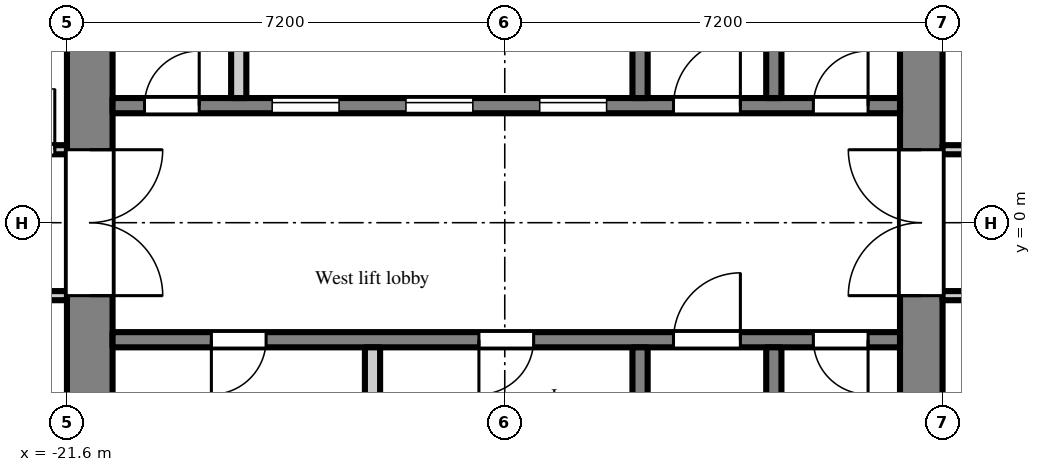
"""IFC4 building model, lengths in metres.
Left out: names, types, materials, properties, quantities, classifications, styles, units other than length and angle.
Written with IfcOpenShell. Run it as: python <this file> out.ifc"""

import sys

from ifc_helpers import new_model, si_unit, direction, frame, frame_2d, origin, place, context, subcontext, project, spatial, rectangle, extrude, element, fill, save


model = new_model("IFC4")
c1 = context("Model", 3, precision=1e-05, world=origin(), true_north=direction((0.0, 1.0)))
c2 = subcontext(c1, "Body", "Model", "MODEL_VIEW")
j1 = project(units=[si_unit("LENGTHUNIT", "METRE"), si_unit("PLANEANGLEUNIT", "RADIAN")], contexts=[c1])
p1 = place(None, origin())
s1 = spatial("IfcSite", under=j1, at=p1, CompositionType="ELEMENT")
p2 = place(p1, origin())
s2 = spatial("IfcBuilding", under=s1, at=p2, CompositionType="ELEMENT")
p3 = place(p2, frame((0.0, 0.0, 198.9)))
s3 = spatial("IfcBuildingStorey", under=s2, at=p3, CompositionType="ELEMENT", Elevation=198.9)
p4 = place(p3, frame((-7.55, -7.2, 0.0), z_axis=(0.0, 0.0, 1.0), x_axis=(0.0, 1.0, 0.0)))
e1 = element("IfcWall", 1, at=p4, inside=s3, PredefinedType="SHEAR", context=c2, shape_type="SweptSolid", body=[
    extrude(rectangle(XDim=14.4, YDim=0.7, at=frame_2d((7.2, 0.0))), origin(), (0.0, 0.0, 1.0), 2.6),
])
p5 = place(p4, frame((6.0, 0.0, 0.0)))
e2 = element("IfcOpeningElement", 2, at=p5, cuts=e1, PredefinedType="OPENING", context=c2, shape_type="SweptSolid", body=[
    extrude(rectangle(XDim=2.4, YDim=2.2, at=frame_2d((1.2, 1.1))), frame((0.0, 0.36, 0.0), z_axis=(0.0, -1.0, 0.0), x_axis=(1.0, 0.0, 0.0)), (0.0, 0.0, 1.0), 0.72),
])
p6 = place(p3, frame((-21.225, -7.2, 0.0), z_axis=(0.0, 0.0, 1.0), x_axis=(0.0, 1.0, 0.0)))
e3 = element("IfcWall", 3, at=p6, inside=s3, PredefinedType="SHEAR", context=c2, shape_type="SweptSolid", body=[
    extrude(rectangle(XDim=14.4, YDim=0.75, at=frame_2d((7.2, 0.0))), origin(), (0.0, 0.0, 1.0), 2.6),
])
p7 = place(p6, frame((6.0, 0.0, 0.0)))
e4 = element("IfcOpeningElement", 4, at=p7, cuts=e3, PredefinedType="OPENING", context=c2, shape_type="SweptSolid", body=[
    extrude(rectangle(XDim=2.4, YDim=2.2, at=frame_2d((1.2, 1.1))), frame((0.0, 0.385, 0.0), z_axis=(0.0, -1.0, 0.0), x_axis=(1.0, 0.0, 0.0)), (0.0, 0.0, 1.0), 0.77),
])
p8 = place(p3, frame((-7.9, 1.925, 0.0), z_axis=(0.0, 0.0, 1.0), x_axis=(-1.0, 0.0, 0.0)))
e5 = element("IfcWall", 5, at=p8, inside=s3, PredefinedType="SHEAR", context=c2, shape_type="SweptSolid", body=[
    extrude(rectangle(XDim=12.95, YDim=0.25, at=frame_2d((6.475, 0.0))), origin(), (0.0, 0.0, 1.0), 2.6),
])
p9 = place(p8, frame((4.825, 0.0, 0.0)))
e6 = element("IfcOpeningElement", 6, at=p9, cuts=e5, PredefinedType="OPENING", context=c2, shape_type="SweptSolid", body=[
    extrude(rectangle(XDim=1.1, YDim=2.1, at=frame_2d((0.55, 1.05))), frame((0.0, 0.135, 0.0), z_axis=(0.0, -1.0, 0.0), x_axis=(1.0, 0.0, 0.0)), (0.0, 0.0, 1.0), 0.27),
])
p10 = place(p8, frame((7.025, 0.0, 0.0)))
e7 = element("IfcOpeningElement", 7, at=p10, cuts=e5, PredefinedType="OPENING", context=c2, shape_type="SweptSolid", body=[
    extrude(rectangle(XDim=1.1, YDim=2.1, at=frame_2d((0.55, 1.05))), frame((0.0, 0.135, 0.0), z_axis=(0.0, -1.0, 0.0), x_axis=(1.0, 0.0, 0.0)), (0.0, 0.0, 1.0), 0.27),
])
p11 = place(p8, frame((9.225, 0.0, 0.0)))
e8 = element("IfcOpeningElement", 8, at=p11, cuts=e5, PredefinedType="OPENING", context=c2, shape_type="SweptSolid", body=[
    extrude(rectangle(XDim=1.1, YDim=2.1, at=frame_2d((0.55, 1.05))), frame((0.0, 0.135, 0.0), z_axis=(0.0, -1.0, 0.0), x_axis=(1.0, 0.0, 0.0)), (0.0, 0.0, 1.0), 0.27),
])
p12 = place(p8, frame((0.525, 0.0, 0.0)))
e9 = element("IfcOpeningElement", 9, at=p12, cuts=e5, PredefinedType="OPENING", context=c2, shape_type="SweptSolid", body=[
    extrude(rectangle(XDim=0.9, YDim=2.1, at=frame_2d((0.45, 1.05))), frame((0.0, 0.135, 0.0), z_axis=(0.0, -1.0, 0.0), x_axis=(1.0, 0.0, 0.0)), (0.0, 0.0, 1.0), 0.27),
])
p13 = place(p8, frame((2.625, 0.0, 0.0)))
e10 = element("IfcOpeningElement", 10, at=p13, cuts=e5, PredefinedType="OPENING", context=c2, shape_type="SweptSolid", body=[
    extrude(rectangle(XDim=1.1, YDim=2.1, at=frame_2d((0.55, 1.05))), frame((0.0, 0.135, 0.0), z_axis=(0.0, -1.0, 0.0), x_axis=(1.0, 0.0, 0.0)), (0.0, 0.0, 1.0), 0.27),
])
p14 = place(p8, frame((11.525, 0.0, 0.0)))
e11 = element("IfcOpeningElement", 11, at=p14, cuts=e5, PredefinedType="OPENING", context=c2, shape_type="SweptSolid", body=[
    extrude(rectangle(XDim=0.9, YDim=2.1, at=frame_2d((0.45, 1.05))), frame((0.0, 0.135, 0.0), z_axis=(0.0, -1.0, 0.0), x_axis=(1.0, 0.0, 0.0)), (0.0, 0.0, 1.0), 0.27),
])
p15 = place(p3, frame((-9.975, 2.05, 0.0), z_axis=(0.0, 0.0, 1.0), x_axis=(0.0, 1.0, 0.0)))
e12 = element("IfcWall", 12, at=p15, inside=s3, PredefinedType="SHEAR", context=c2, shape_type="SweptSolid", body=[
    extrude(rectangle(XDim=4.75, YDim=0.25, at=frame_2d((2.375, 0.0))), origin(), (0.0, 0.0, 1.0), 2.6),
])
p16 = place(p15, frame((2.95, 0.0, 0.0)))
e13 = element("IfcOpeningElement", 13, at=p16, cuts=e12, PredefinedType="OPENING", context=c2, shape_type="SweptSolid", body=[
    extrude(rectangle(XDim=1.1, YDim=2.1, at=frame_2d((0.55, 1.05))), frame((0.0, 0.135, 0.0), z_axis=(0.0, -1.0, 0.0), x_axis=(1.0, 0.0, 0.0)), (0.0, 0.0, 1.0), 0.27),
])
p17 = place(p3, frame((-12.175, 2.05, 0.0), z_axis=(0.0, 0.0, 1.0), x_axis=(0.0, 1.0, 0.0)))
e14 = element("IfcWall", 14, at=p17, inside=s3, PredefinedType="SHEAR", context=c2, shape_type="SweptSolid", body=[
    extrude(rectangle(XDim=4.75, YDim=0.25, at=frame_2d((2.375, 0.0))), origin(), (0.0, 0.0, 1.0), 2.6),
])
p18 = place(p17, frame((3.0, 0.0, 0.0)))
e15 = element("IfcOpeningElement", 15, at=p18, cuts=e14, PredefinedType="OPENING", context=c2, shape_type="SweptSolid", body=[
    extrude(rectangle(XDim=1.1, YDim=2.1, at=frame_2d((0.55, 1.05))), frame((0.0, 0.135, 0.0), z_axis=(0.0, -1.0, 0.0), x_axis=(1.0, 0.0, 0.0)), (0.0, 0.0, 1.0), 0.27),
])
p19 = place(p3, frame((-18.775, 2.05, 0.0), z_axis=(0.0, 0.0, 1.0), x_axis=(0.0, 1.0, 0.0)))
e16 = element("IfcWall", 16, at=p19, inside=s3, PredefinedType="PARTITIONING", context=c2, shape_type="SweptSolid", body=[
    extrude(rectangle(XDim=2.1, YDim=0.25, at=frame_2d((1.05, 0.0))), origin(), (0.0, 0.0, 1.0), 2.6),
])
p20 = place(p3, frame((-7.9, -1.925, 0.0), z_axis=(0.0, 0.0, 1.0), x_axis=(-1.0, 0.0, 0.0)))
e17 = element("IfcWall", 17, at=p20, inside=s3, PredefinedType="SHEAR", context=c2, shape_type="SweptSolid", body=[
    extrude(rectangle(XDim=12.95, YDim=0.25, at=frame_2d((6.475, 0.0))), origin(), (0.0, 0.0, 1.0), 2.6),
])
p21 = place(p20, frame((0.525, 0.0, 0.0)))
e18 = element("IfcOpeningElement", 18, at=p21, cuts=e17, PredefinedType="OPENING", context=c2, shape_type="SweptSolid", body=[
    extrude(rectangle(XDim=0.9, YDim=2.1, at=frame_2d((0.45, 1.05))), frame((0.0, 0.135, 0.0), z_axis=(0.0, -1.0, 0.0), x_axis=(1.0, 0.0, 0.0)), (0.0, 0.0, 1.0), 0.27),
])
p22 = place(p20, frame((2.625, 0.0, 0.0)))
e19 = element("IfcOpeningElement", 19, at=p22, cuts=e17, PredefinedType="OPENING", context=c2, shape_type="SweptSolid", body=[
    extrude(rectangle(XDim=1.1, YDim=2.1, at=frame_2d((0.55, 1.05))), frame((0.0, 0.135, 0.0), z_axis=(0.0, -1.0, 0.0), x_axis=(1.0, 0.0, 0.0)), (0.0, 0.0, 1.0), 0.27),
])
p23 = place(p20, frame((6.025, 0.0, 0.0)))
e20 = element("IfcOpeningElement", 20, at=p23, cuts=e17, PredefinedType="OPENING", context=c2, shape_type="SweptSolid", body=[
    extrude(rectangle(XDim=0.9, YDim=2.1, at=frame_2d((0.45, 1.05))), frame((0.0, 0.135, 0.0), z_axis=(0.0, -1.0, 0.0), x_axis=(1.0, 0.0, 0.0)), (0.0, 0.0, 1.0), 0.27),
])
p24 = place(p20, frame((10.425, 0.0, 0.0)))
e21 = element("IfcOpeningElement", 21, at=p24, cuts=e17, PredefinedType="OPENING", context=c2, shape_type="SweptSolid", body=[
    extrude(rectangle(XDim=0.9, YDim=2.1, at=frame_2d((0.45, 1.05))), frame((0.0, 0.135, 0.0), z_axis=(0.0, -1.0, 0.0), x_axis=(1.0, 0.0, 0.0)), (0.0, 0.0, 1.0), 0.27),
])
p25 = place(p3, frame((-9.975, -2.05, 0.0), z_axis=(0.0, 0.0, 1.0), x_axis=(0.0, -1.0, 0.0)))
e22 = element("IfcWall", 22, at=p25, inside=s3, PredefinedType="SHEAR", context=c2, shape_type="SweptSolid", body=[
    extrude(rectangle(XDim=4.75, YDim=0.25, at=frame_2d((2.375, 0.0))), origin(), (0.0, 0.0, 1.0), 2.6),
])
p26 = place(p25, frame((2.95, 0.0, 0.0)))
e23 = element("IfcOpeningElement", 23, at=p26, cuts=e22, PredefinedType="OPENING", context=c2, shape_type="SweptSolid", body=[
    extrude(rectangle(XDim=1.1, YDim=2.1, at=frame_2d((0.55, 1.05))), frame((0.0, 0.135, 0.0), z_axis=(0.0, -1.0, 0.0), x_axis=(1.0, 0.0, 0.0)), (0.0, 0.0, 1.0), 0.27),
])
p27 = place(p3, frame((-12.175, -2.05, 0.0), z_axis=(0.0, 0.0, 1.0), x_axis=(0.0, -1.0, 0.0)))
e24 = element("IfcWall", 24, at=p27, inside=s3, PredefinedType="SHEAR", context=c2, shape_type="SweptSolid", body=[
    extrude(rectangle(XDim=4.75, YDim=0.25, at=frame_2d((2.375, 0.0))), origin(), (0.0, 0.0, 1.0), 2.6),
])
p28 = place(p27, frame((3.0, 0.0, 0.0)))
e25 = element("IfcOpeningElement", 25, at=p28, cuts=e24, PredefinedType="OPENING", context=c2, shape_type="SweptSolid", body=[
    extrude(rectangle(XDim=1.1, YDim=2.1, at=frame_2d((0.55, 1.05))), frame((0.0, 0.135, 0.0), z_axis=(0.0, -1.0, 0.0), x_axis=(1.0, 0.0, 0.0)), (0.0, 0.0, 1.0), 0.27),
])
p29 = place(p3, frame((-16.575, -2.05, 0.0), z_axis=(0.0, 0.0, 1.0), x_axis=(0.0, -1.0, 0.0)))
e26 = element("IfcWall", 26, at=p29, inside=s3, PredefinedType="PARTITIONING", context=c2, shape_type="SweptSolid", body=[
    extrude(rectangle(XDim=2.1, YDim=0.25, at=frame_2d((1.05, 0.0))), origin(), (0.0, 0.0, 1.0), 2.6),
])
p30 = place(p3, frame((-25.125, -1.2, 0.0), z_axis=(0.0, 0.0, 1.0), x_axis=(1.0, 0.0, 0.0)))
e27 = element("IfcWall", 27, at=p30, inside=s3, PredefinedType="PARTITIONING", context=c2, shape_type="SweptSolid", body=[
    extrude(rectangle(XDim=3.525, YDim=0.15, at=frame_2d((1.762, 0.0))), origin(), (0.0, 0.0, 1.0), 2.6),
])
p31 = place(p30, frame((1.925, 0.0, 0.0)))
e28 = element("IfcOpeningElement", 28, at=p31, cuts=e27, PredefinedType="OPENING", context=c2, shape_type="SweptSolid", body=[
    extrude(rectangle(XDim=1.0, YDim=2.1, at=frame_2d((0.5, 1.05))), frame((0.0, 0.085, 0.0), z_axis=(0.0, -1.0, 0.0), x_axis=(1.0, 0.0, 0.0)), (0.0, 0.0, 1.0), 0.17),
])
p32 = place(p3, frame((-25.125, 1.2, 0.0), z_axis=(0.0, 0.0, 1.0), x_axis=(1.0, 0.0, 0.0)))
e29 = element("IfcWall", 29, at=p32, inside=s3, PredefinedType="PARTITIONING", context=c2, shape_type="SweptSolid", body=[
    extrude(rectangle(XDim=3.525, YDim=0.15, at=frame_2d((1.762, 0.0))), origin(), (0.0, 0.0, 1.0), 2.6),
])
p33 = place(p32, frame((2.325, 0.0, 0.0)))
e30 = element("IfcOpeningElement", 30, at=p33, cuts=e29, PredefinedType="OPENING", context=c2, shape_type="SweptSolid", body=[
    extrude(rectangle(XDim=1.0, YDim=2.1, at=frame_2d((0.5, 1.05))), frame((0.0, 0.085, 0.0), z_axis=(0.0, -1.0, 0.0), x_axis=(1.0, 0.0, 0.0)), (0.0, 0.0, 1.0), 0.17),
])
p34 = place(p3, frame((-7.2, -1.2, 0.0), z_axis=(0.0, 0.0, 1.0), x_axis=(1.0, 0.0, 0.0)))
e31 = element("IfcWall", 31, at=p34, inside=s3, PredefinedType="PARTITIONING", context=c2, shape_type="SweptSolid", body=[
    extrude(rectangle(XDim=6.075, YDim=0.15, at=frame_2d((3.038, 0.0))), origin(), (0.0, 0.0, 1.0), 2.6),
])
p35 = place(p34, frame((2.55, 0.0, 0.0)))
e32 = element("IfcOpeningElement", 32, at=p35, cuts=e31, PredefinedType="OPENING", context=c2, shape_type="SweptSolid", body=[
    extrude(rectangle(XDim=0.9, YDim=2.1, at=frame_2d((0.45, 1.05))), frame((0.0, 0.085, 0.0), z_axis=(0.0, -1.0, 0.0), x_axis=(1.0, 0.0, 0.0)), (0.0, 0.0, 1.0), 0.17),
])
p36 = place(p3, frame((-7.2, 1.2, 0.0), z_axis=(0.0, 0.0, 1.0), x_axis=(1.0, 0.0, 0.0)))
e33 = element("IfcWall", 33, at=p36, inside=s3, PredefinedType="PARTITIONING", context=c2, shape_type="SweptSolid", body=[
    extrude(rectangle(XDim=6.075, YDim=0.15, at=frame_2d((3.038, 0.0))), origin(), (0.0, 0.0, 1.0), 2.6),
])
p37 = place(p36, frame((2.55, 0.0, 0.0)))
e34 = element("IfcOpeningElement", 34, at=p37, cuts=e33, PredefinedType="OPENING", context=c2, shape_type="SweptSolid", body=[
    extrude(rectangle(XDim=0.9, YDim=2.1, at=frame_2d((0.45, 1.05))), frame((0.0, 0.085, 0.0), z_axis=(0.0, -1.0, 0.0), x_axis=(1.0, 0.0, 0.0)), (0.0, 0.0, 1.0), 0.17),
])
p38 = place(p36, frame((0.55, 0.0, 0.0)))
e35 = element("IfcOpeningElement", 35, at=p38, cuts=e33, PredefinedType="OPENING", context=c2, shape_type="SweptSolid", body=[
    extrude(rectangle(XDim=0.9, YDim=2.1, at=frame_2d((0.45, 1.05))), frame((0.0, 0.085, 0.0), z_axis=(0.0, -1.0, 0.0), x_axis=(1.0, 0.0, 0.0)), (0.0, 0.0, 1.0), 0.17),
])
p39 = place(p9, origin())
e36 = element("IfcDoor", 36, at=p39, inside=s3, OperationType="SLIDING_TO_LEFT", PredefinedType="DOOR", context=c2, shape_type="SweptSolid", body=[
    extrude(rectangle(XDim=1.1, YDim=2.1, at=frame_2d((0.55, 1.05))), frame((0.0, 0.025, 0.0), z_axis=(0.0, -1.0, 0.0), x_axis=(1.0, 0.0, 0.0)), (0.0, 0.0, 1.0), 0.05),
])
fill(e6, e36)
p40 = place(p10, origin())
e37 = element("IfcDoor", 37, at=p40, inside=s3, OperationType="SLIDING_TO_LEFT", PredefinedType="DOOR", context=c2, shape_type="SweptSolid", body=[
    extrude(rectangle(XDim=1.1, YDim=2.1, at=frame_2d((0.55, 1.05))), frame((0.0, 0.025, 0.0), z_axis=(0.0, -1.0, 0.0), x_axis=(1.0, 0.0, 0.0)), (0.0, 0.0, 1.0), 0.05),
])
fill(e7, e37)
p41 = place(p11, origin())
e38 = element("IfcDoor", 38, at=p41, inside=s3, OperationType="SLIDING_TO_LEFT", PredefinedType="DOOR", context=c2, shape_type="SweptSolid", body=[
    extrude(rectangle(XDim=1.1, YDim=2.1, at=frame_2d((0.55, 1.05))), frame((0.0, 0.025, 0.0), z_axis=(0.0, -1.0, 0.0), x_axis=(1.0, 0.0, 0.0)), (0.0, 0.0, 1.0), 0.05),
])
fill(e8, e38)
p42 = place(p12, frame((0.9, 0.0, 0.0), z_axis=(0.0, 0.0, 1.0), x_axis=(-1.0, 0.0, 0.0)))
e39 = element("IfcDoor", 39, at=p42, inside=s3, OperationType="SINGLE_SWING_RIGHT", PredefinedType="DOOR", context=c2, shape_type="SweptSolid", body=[
    extrude(rectangle(XDim=0.9, YDim=2.1, at=frame_2d((0.45, 1.05))), frame((0.0, 0.025, 0.0), z_axis=(0.0, -1.0, 0.0), x_axis=(1.0, 0.0, 0.0)), (0.0, 0.0, 1.0), 0.05),
])
fill(e9, e39)
p43 = place(p21, origin())
e40 = element("IfcDoor", 40, at=p43, inside=s3, OperationType="SINGLE_SWING_LEFT", PredefinedType="DOOR", context=c2, shape_type="SweptSolid", body=[
    extrude(rectangle(XDim=0.9, YDim=2.1, at=frame_2d((0.45, 1.05))), frame((0.0, 0.025, 0.0), z_axis=(0.0, -1.0, 0.0), x_axis=(1.0, 0.0, 0.0)), (0.0, 0.0, 1.0), 0.05),
])
fill(e18, e40)
p44 = place(p13, frame((1.1, 0.0, 0.0), z_axis=(0.0, 0.0, 1.0), x_axis=(-1.0, 0.0, 0.0)))
e41 = element("IfcDoor", 41, at=p44, inside=s3, OperationType="SINGLE_SWING_RIGHT", PredefinedType="DOOR", context=c2, shape_type="SweptSolid", body=[
    extrude(rectangle(XDim=1.1, YDim=2.1, at=frame_2d((0.55, 1.05))), frame((0.0, 0.025, 0.0), z_axis=(0.0, -1.0, 0.0), x_axis=(1.0, 0.0, 0.0)), (0.0, 0.0, 1.0), 0.05),
])
fill(e10, e41)
p45 = place(p22, frame((1.1, 0.0, 0.0), z_axis=(0.0, 0.0, 1.0), x_axis=(-1.0, 0.0, 0.0)))
e42 = element("IfcDoor", 42, at=p45, inside=s3, OperationType="SINGLE_SWING_RIGHT", PredefinedType="DOOR", context=c2, shape_type="SweptSolid", body=[
    extrude(rectangle(XDim=1.1, YDim=2.1, at=frame_2d((0.55, 1.05))), frame((0.0, 0.025, 0.0), z_axis=(0.0, -1.0, 0.0), x_axis=(1.0, 0.0, 0.0)), (0.0, 0.0, 1.0), 0.05),
])
fill(e19, e42)
p46 = place(p5, origin())
e43 = element("IfcDoor", 43, at=p46, inside=s3, OperationType="DOUBLE_DOOR_DOUBLE_SWING", PredefinedType="DOOR", context=c2, shape_type="SweptSolid", body=[
    extrude(rectangle(XDim=2.4, YDim=2.2, at=frame_2d((1.2, 1.1))), frame((0.0, 0.025, 0.0), z_axis=(0.0, -1.0, 0.0), x_axis=(1.0, 0.0, 0.0)), (0.0, 0.0, 1.0), 0.05),
])
fill(e2, e43)
p47 = place(p7, frame((2.4, 0.0, 0.0), z_axis=(0.0, 0.0, 1.0), x_axis=(-1.0, 0.0, 0.0)))
e44 = element("IfcDoor", 44, at=p47, inside=s3, OperationType="DOUBLE_DOOR_DOUBLE_SWING", PredefinedType="DOOR", context=c2, shape_type="SweptSolid", body=[
    extrude(rectangle(XDim=2.4, YDim=2.2, at=frame_2d((1.2, 1.1))), frame((0.0, 0.025, 0.0), z_axis=(0.0, -1.0, 0.0), x_axis=(1.0, 0.0, 0.0)), (0.0, 0.0, 1.0), 0.05),
])
fill(e4, e44)
p48 = place(p14, frame((0.9, 0.0, 0.0), z_axis=(0.0, 0.0, 1.0), x_axis=(-1.0, 0.0, 0.0)))
e45 = element("IfcDoor", 45, at=p48, inside=s3, OperationType="SINGLE_SWING_RIGHT", PredefinedType="DOOR", context=c2, shape_type="SweptSolid", body=[
    extrude(rectangle(XDim=0.9, YDim=2.1, at=frame_2d((0.45, 1.05))), frame((0.0, 0.025, 0.0), z_axis=(0.0, -1.0, 0.0), x_axis=(1.0, 0.0, 0.0)), (0.0, 0.0, 1.0), 0.05),
])
fill(e11, e45)
p49 = place(p23, origin())
e46 = element("IfcDoor", 46, at=p49, inside=s3, OperationType="SINGLE_SWING_RIGHT", PredefinedType="DOOR", context=c2, shape_type="SweptSolid", body=[
    extrude(rectangle(XDim=0.9, YDim=2.1, at=frame_2d((0.45, 1.05))), frame((0.0, 0.025, 0.0), z_axis=(0.0, -1.0, 0.0), x_axis=(1.0, 0.0, 0.0)), (0.0, 0.0, 1.0), 0.05),
])
fill(e20, e46)
p50 = place(p24, origin())
e47 = element("IfcDoor", 47, at=p50, inside=s3, OperationType="SINGLE_SWING_RIGHT", PredefinedType="DOOR", context=c2, shape_type="SweptSolid", body=[
    extrude(rectangle(XDim=0.9, YDim=2.1, at=frame_2d((0.45, 1.05))), frame((0.0, 0.025, 0.0), z_axis=(0.0, -1.0, 0.0), x_axis=(1.0, 0.0, 0.0)), (0.0, 0.0, 1.0), 0.05),
])
fill(e21, e47)
p51 = place(p33, origin())
e48 = element("IfcDoor", 48, at=p51, inside=s3, OperationType="SINGLE_SWING_RIGHT", PredefinedType="DOOR", context=c2, shape_type="SweptSolid", body=[
    extrude(rectangle(XDim=1.0, YDim=2.1, at=frame_2d((0.5, 1.05))), frame((0.0, 0.025, 0.0), z_axis=(0.0, -1.0, 0.0), x_axis=(1.0, 0.0, 0.0)), (0.0, 0.0, 1.0), 0.05),
])
fill(e30, e48)
save(model, sys.argv[1])
